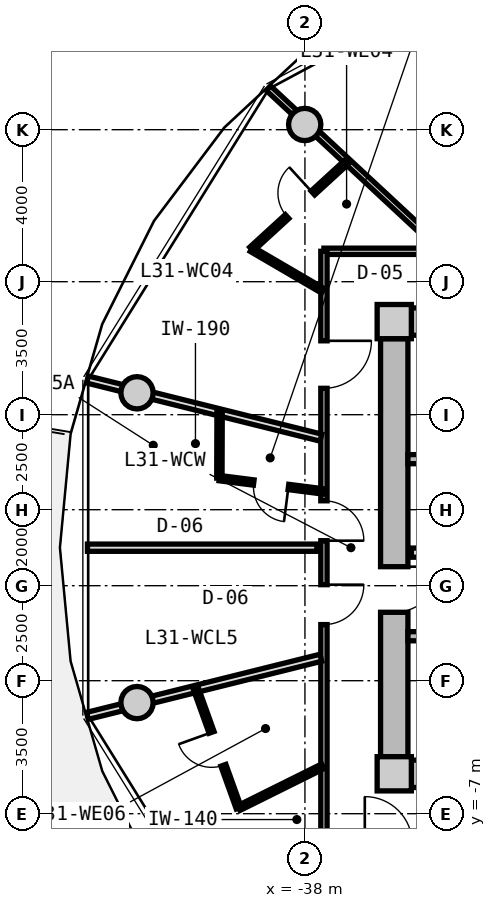
"""IFC4 building model, lengths in metres.
Left out: names, types, materials, properties, quantities, classifications, styles, units other than length and angle.
Written with IfcOpenShell. Run it as: python <this file> out.ifc"""

import sys

from ifc_helpers import new_model, si_unit, direction, frame, frame_2d, origin, origin_2d, place, context, subcontext, project, spatial, rectangle, circle, extrude, source, transform, mapped, element, fill, save


model = new_model("IFC4")
c1 = context("Model", 3, precision=1e-05, world=origin(), true_north=direction((0.0, 1.0)))
c2 = subcontext(c1, "Body", "Model", "MODEL_VIEW")
j1 = project(units=[si_unit("LENGTHUNIT", "METRE"), si_unit("PLANEANGLEUNIT", "RADIAN")], contexts=[c1])
p1 = place(None, origin())
s1 = spatial("IfcSite", under=j1, at=p1, CompositionType="ELEMENT")
p2 = place(p1, origin())
s2 = spatial("IfcBuilding", under=s1, at=p2, CompositionType="ELEMENT")
p3 = place(p2, frame((0.0, 0.0, 102.35)))
s3 = spatial("IfcBuildingStorey", under=s2, at=p3, CompositionType="ELEMENT", Elevation=102.35)
m1 = source(origin(), c2, "Body", "SweptSolid", [
    extrude(rectangle(XDim=0.9, YDim=0.9, at=origin_2d()), origin(), (0.0, 0.0, 1.0), 3.05),
])
for number, where, z_axis, x_axis in (
    (1, (-35.65, -5.95, 0.0), (0.0, 0.0, 1.0), (1.0, 0.0, 0.0)),
    (2, (-35.65, 5.95, 0.0), (0.0, 0.0, 1.0), (1.0, 0.0, 0.0)),
):
    element("IfcColumn", number, at=place(p3, frame(where, z_axis=z_axis, x_axis=x_axis)), inside=s3, PredefinedType="COLUMN", context=c2, shape_type="MappedRepresentation", body=[
        mapped(m1, transform((0.0, 0.0, 0.0), x_axis=(1.0, 0.0, 0.0), y_axis=(0.0, 1.0, 0.0), z_axis=(0.0, 0.0, 1.0), scale=1.0)),
    ])
m2 = source(origin(), c2, "Body", "SweptSolid", [
    extrude(rectangle(XDim=14.4, YDim=0.72, at=frame_2d((7.2, 0.0))), origin(), (0.0, 0.0, 1.0), 2.79),
])
for number, where, z_axis, x_axis in (
    (3, (-35.2, 5.95, 0.0), (0.0, 0.0, 1.0), (1.0, 0.0, 0.0)),
    (4, (-20.8, -5.95, 0.0), (0.0, 0.0, 1.0), (-1.0, 0.0, 0.0)),
):
    element("IfcWall", number, at=place(p3, frame(where, z_axis=z_axis, x_axis=x_axis)), inside=s3, PredefinedType="SHEAR", context=c2, shape_type="MappedRepresentation", body=[
        mapped(m2, transform((0.0, 0.0, 0.0), x_axis=(1.0, 0.0, 0.0), y_axis=(0.0, 1.0, 0.0), z_axis=(0.0, 0.0, 1.0), scale=1.0)),
    ])
m3 = source(origin(), c2, "Body", "SweptSolid", [
    extrude(rectangle(XDim=11.0, YDim=0.72, at=frame_2d((5.5, 0.0))), origin(), (0.0, 0.0, 1.0), 2.79),
])
p4 = place(p3, frame((-35.65, -5.5, 0.0), z_axis=(0.0, 0.0, 1.0), x_axis=(0.0, 1.0, 0.0)))
e5 = element("IfcWall", 5, at=p4, inside=s3, PredefinedType="SHEAR", context=c2, shape_type="MappedRepresentation", body=[
    mapped(m3, transform((0.0, 0.0, 0.0), x_axis=(1.0, 0.0, 0.0), y_axis=(0.0, 1.0, 0.0), z_axis=(0.0, 0.0, 1.0), scale=1.0)),
])
p5 = place(p4, frame((3.8, 0.0, 0.0)))
e6 = element("IfcOpeningElement", 6, at=p5, cuts=e5, PredefinedType="OPENING", context=c2, shape_type="SweptSolid", body=[
    extrude(rectangle(XDim=1.2, YDim=2.15, at=frame_2d((0.6, 1.075))), frame((0.0, 0.37, 0.0), z_axis=(0.0, -1.0, 0.0), x_axis=(1.0, 0.0, 0.0)), (0.0, 0.0, 1.0), 0.74),
])
m4 = source(origin(), c2, "Body", "SweptSolid", [
    extrude(circle(Radius=0.425, at=origin_2d()), origin(), (0.0, 0.0, 1.0), 3.05),
])
for number, where, z_axis, x_axis in (
    (7, (-38.006, 11.137, 0.0), (0.0, 0.0, 1.0), (1.0, 0.0, 0.0)),
    (8, (-42.419, 4.076, 0.0), (0.0, 0.0, 1.0), (1.0, 0.0, 0.0)),
    (9, (-42.419, -4.076, 0.0), (0.0, 0.0, 1.0), (1.0, 0.0, 0.0)),
):
    element("IfcColumn", number, at=place(p3, frame(where, z_axis=z_axis, x_axis=x_axis)), inside=s3, PredefinedType="COLUMN", context=c2, shape_type="MappedRepresentation", body=[
        mapped(m4, transform((0.0, 0.0, 0.0), x_axis=(1.0, 0.0, 0.0), y_axis=(0.0, 1.0, 0.0), z_axis=(0.0, 0.0, 1.0), scale=1.0)),
    ])
m5 = source(origin(), c2, "Body", "SweptSolid", [
    extrude(rectangle(XDim=7.83, YDim=0.24, at=frame_2d((3.915, 0.0))), origin(), (0.0, 0.0, 1.0), 2.79),
])
p6 = place(p3, frame((-35.29, 2.33, 0.0), z_axis=(0.0, 0.0, 1.0), x_axis=(1.0, 0.0, 0.0)))
e10 = element("IfcWall", 10, at=p6, inside=s3, PredefinedType="PARTITIONING", context=c2, shape_type="MappedRepresentation", body=[
    mapped(m5, transform((0.0, 0.0, 0.0), x_axis=(1.0, 0.0, 0.0), y_axis=(0.0, 1.0, 0.0), z_axis=(0.0, 0.0, 1.0), scale=1.0)),
])
p7 = place(p3, frame((-35.29, -2.33, 0.0), z_axis=(0.0, 0.0, 1.0), x_axis=(1.0, 0.0, 0.0)))
e11 = element("IfcWall", 11, at=p7, inside=s3, PredefinedType="PARTITIONING", context=c2, shape_type="MappedRepresentation", body=[
    mapped(m5, transform((0.0, 0.0, 0.0), x_axis=(1.0, 0.0, 0.0), y_axis=(0.0, 1.0, 0.0), z_axis=(0.0, 0.0, 1.0), scale=1.0)),
])
p8 = place(p7, frame((0.95, 0.0, 0.0)))
e12 = element("IfcOpeningElement", 12, at=p8, cuts=e11, PredefinedType="OPENING", context=c2, shape_type="SweptSolid", body=[
    extrude(rectangle(XDim=1.1, YDim=2.15, at=frame_2d((0.55, 1.075))), frame((0.0, 0.13, 0.0), z_axis=(0.0, -1.0, 0.0), x_axis=(1.0, 0.0, 0.0)), (0.0, 0.0, 1.0), 0.26),
])
m6 = source(origin(), c2, "Body", "SweptSolid", [
    extrude(rectangle(XDim=7.62, YDim=0.24, at=frame_2d((3.81, 0.0))), origin(), (0.0, 0.0, 1.0), 2.775),
])
p9 = place(p3, frame((-35.2, -0.13, 0.0), z_axis=(0.0, 0.0, 1.0), x_axis=(1.0, 0.0, 0.0)))
e13 = element("IfcWall", 13, at=p9, inside=s3, PredefinedType="PARTITIONING", context=c2, shape_type="MappedRepresentation", body=[
    mapped(m6, transform((0.0, 0.0, 0.0), x_axis=(1.0, 0.0, 0.0), y_axis=(0.0, 1.0, 0.0), z_axis=(0.0, 0.0, 1.0), scale=1.0)),
])
p10 = place(p9, frame((6.22, 0.0, 0.0)))
e14 = element("IfcOpeningElement", 14, at=p10, cuts=e13, PredefinedType="OPENING", context=c2, shape_type="SweptSolid", body=[
    extrude(rectangle(XDim=1.0, YDim=2.1, at=frame_2d((0.5, 1.05))), frame((0.0, 0.13, 0.0), z_axis=(0.0, -1.0, 0.0), x_axis=(1.0, 0.0, 0.0)), (0.0, 0.0, 1.0), 0.26),
])
p11 = place(p9, frame((2.4, 0.0, 0.0)))
e15 = element("IfcOpeningElement", 15, at=p11, cuts=e13, PredefinedType="OPENING", context=c2, shape_type="SweptSolid", body=[
    extrude(rectangle(XDim=1.0, YDim=2.1, at=frame_2d((0.5, 1.05))), frame((0.0, 0.13, 0.0), z_axis=(0.0, -1.0, 0.0), x_axis=(1.0, 0.0, 0.0)), (0.0, 0.0, 1.0), 0.26),
])
m7 = source(origin(), c2, "Body", "SweptSolid", [
    extrude(rectangle(XDim=8.6, YDim=0.165, at=frame_2d((4.3, 0.0))), origin(), (0.0, 0.0, 1.0), 2.775),
])
p12 = place(p3, frame((-37.5, 7.8, 0.0), z_axis=(0.0, 0.0, 1.0), x_axis=(1.0, 0.0, 0.0)))
e16 = element("IfcWall", 16, at=p12, inside=s3, PredefinedType="PARTITIONING", context=c2, shape_type="MappedRepresentation", body=[
    mapped(m7, transform((0.0, 0.0, 0.0), x_axis=(1.0, 0.0, 0.0), y_axis=(0.0, 1.0, 0.0), z_axis=(0.0, 0.0, 1.0), scale=1.0)),
])
m8 = source(origin(), c2, "Body", "SweptSolid", [
    extrude(rectangle(XDim=15.6, YDim=0.165, at=frame_2d((7.8, 0.0))), origin(), (0.0, 0.0, 1.0), 2.775),
])
p13 = place(p3, frame((-37.5, -7.8, 0.0), z_axis=(0.0, 0.0, 1.0), x_axis=(0.0, 1.0, 0.0)))
e17 = element("IfcWall", 17, at=p13, inside=s3, PredefinedType="PARTITIONING", context=c2, shape_type="MappedRepresentation", body=[
    mapped(m8, transform((0.0, 0.0, 0.0), x_axis=(1.0, 0.0, 0.0), y_axis=(0.0, 1.0, 0.0), z_axis=(0.0, 0.0, 1.0), scale=1.0)),
])
p14 = place(p13, frame((11.994, 0.0, 0.0)))
e18 = element("IfcOpeningElement", 18, at=p14, cuts=e17, PredefinedType="OPENING", context=c2, shape_type="SweptSolid", body=[
    extrude(rectangle(XDim=1.25, YDim=2.2, at=frame_2d((0.625, 1.1))), frame((0.0, 0.093, 0.0), z_axis=(0.0, -1.0, 0.0), x_axis=(1.0, 0.0, 0.0)), (0.0, 0.0, 1.0), 0.185),
])
p15 = place(p13, frame((7.984, 0.0, 0.0)))
e19 = element("IfcOpeningElement", 19, at=p15, cuts=e17, PredefinedType="OPENING", context=c2, shape_type="SweptSolid", body=[
    extrude(rectangle(XDim=1.05, YDim=2.15, at=frame_2d((0.525, 1.075))), frame((0.0, 0.093, 0.0), z_axis=(0.0, -1.0, 0.0), x_axis=(1.0, 0.0, 0.0)), (0.0, 0.0, 1.0), 0.185),
])
p16 = place(p13, frame((5.777, 0.0, 0.0)))
e20 = element("IfcOpeningElement", 20, at=p16, cuts=e17, PredefinedType="OPENING", context=c2, shape_type="SweptSolid", body=[
    extrude(rectangle(XDim=1.05, YDim=2.15, at=frame_2d((0.525, 1.075))), frame((0.0, 0.093, 0.0), z_axis=(0.0, -1.0, 0.0), x_axis=(1.0, 0.0, 0.0)), (0.0, 0.0, 1.0), 0.185),
])
m9 = source(origin(), c2, "Body", "SweptSolid", [
    extrude(rectangle(XDim=6.187, YDim=0.165, at=frame_2d((3.093, 0.0))), origin(), (0.0, 0.0, 1.0), 2.275),
])
p17 = place(p3, frame((-34.429, 7.88, 0.0), z_axis=(0.0, 0.0, 1.0), x_axis=(-0.732501077882, 0.680765870841, 0.0)))
e21 = element("IfcWall", 21, at=p17, inside=s3, PredefinedType="PARTITIONING", context=c2, shape_type="MappedRepresentation", body=[
    mapped(m9, transform((0.0, 0.0, 0.0), x_axis=(1.0, 0.0, 0.0), y_axis=(0.0, 1.0, 0.0), z_axis=(0.0, 0.0, 1.0), scale=1.0)),
])
m10 = source(origin(), c2, "Body", "SweptSolid", [
    extrude(rectangle(XDim=6.331, YDim=0.19, at=frame_2d((3.165, 0.0))), origin(), (0.0, 0.0, 1.0), 2.275),
])
p18 = place(p3, frame((-37.58, 2.896, 0.0), z_axis=(0.0, 0.0, 1.0), x_axis=(-0.97036440661, 0.241646267062, 0.0)))
e22 = element("IfcWall", 22, at=p18, inside=s3, PredefinedType="PARTITIONING", context=c2, shape_type="MappedRepresentation", body=[
    mapped(m10, transform((0.0, 0.0, 0.0), x_axis=(1.0, 0.0, 0.0), y_axis=(0.0, 1.0, 0.0), z_axis=(0.0, 0.0, 1.0), scale=1.0)),
])
m11 = source(origin(), c2, "Body", "SweptSolid", [
    extrude(rectangle(XDim=2.172, YDim=0.14, at=frame_2d((1.086, 0.0))), origin(), (0.0, 0.0, 1.0), 2.775),
])
p19 = place(p3, frame((-37.53, 6.762, 0.0), z_axis=(0.0, 0.0, 1.0), x_axis=(-0.863562702562, 0.504241468688, 0.0)))
e23 = element("IfcWall", 23, at=p19, inside=s3, PredefinedType="PARTITIONING", context=c2, shape_type="MappedRepresentation", body=[
    mapped(m11, transform((0.0, 0.0, 0.0), x_axis=(1.0, 0.0, 0.0), y_axis=(0.0, 1.0, 0.0), z_axis=(0.0, 0.0, 1.0), scale=1.0)),
])
m12 = source(origin(), c2, "Body", "SweptSolid", [
    extrude(rectangle(XDim=3.457, YDim=0.14, at=frame_2d((1.729, 0.0))), origin(), (0.0, 0.0, 1.0), 2.775),
])
p20 = place(p3, frame((-39.405, 7.857, 0.0), z_axis=(0.0, 0.0, 1.0), x_axis=(0.737567375492, 0.675273549467, 0.0)))
e24 = element("IfcWall", 24, at=p20, inside=s3, PredefinedType="PARTITIONING", context=c2, shape_type="MappedRepresentation", body=[
    mapped(m12, transform((0.0, 0.0, 0.0), x_axis=(1.0, 0.0, 0.0), y_axis=(0.0, 1.0, 0.0), z_axis=(0.0, 0.0, 1.0), scale=1.0)),
])
p21 = place(p20, frame((1.268, 0.0, 0.0)))
e25 = element("IfcOpeningElement", 25, at=p21, cuts=e24, PredefinedType="OPENING", context=c2, shape_type="SweptSolid", body=[
    extrude(rectangle(XDim=0.92, YDim=2.1, at=frame_2d((0.46, 1.05))), frame((0.0, 0.08, 0.0), z_axis=(0.0, -1.0, 0.0), x_axis=(1.0, 0.0, 0.0)), (0.0, 0.0, 1.0), 0.16),
])
p22 = place(p3, frame((-37.58, -2.896, 0.0), z_axis=(0.0, 0.0, 1.0), x_axis=(-0.97036440661, -0.241646267062, 0.0)))
e26 = element("IfcWall", 26, at=p22, inside=s3, PredefinedType="PARTITIONING", context=c2, shape_type="MappedRepresentation", body=[
    mapped(m10, transform((0.0, 0.0, 0.0), x_axis=(1.0, 0.0, 0.0), y_axis=(0.0, 1.0, 0.0), z_axis=(0.0, 0.0, 1.0), scale=1.0)),
])
m13 = source(origin(), c2, "Body", "SweptSolid", [
    extrude(rectangle(XDim=6.039, YDim=0.19, at=frame_2d((3.019, 0.0))), origin(), (0.0, 0.0, 1.0), 2.775),
])
p23 = place(p3, frame((-37.685, 0.0, 0.0), z_axis=(0.0, 0.0, 1.0), x_axis=(-1.0, 0.0, 0.0)))
e27 = element("IfcWall", 27, at=p23, inside=s3, PredefinedType="PARTITIONING", context=c2, shape_type="MappedRepresentation", body=[
    mapped(m13, transform((0.0, 0.0, 0.0), x_axis=(1.0, 0.0, 0.0), y_axis=(0.0, 1.0, 0.0), z_axis=(0.0, 0.0, 1.0), scale=1.0)),
])
m14 = source(origin(), c2, "Body", "SweptSolid", [
    extrude(rectangle(XDim=2.744, YDim=0.14, at=frame_2d((1.372, 0.0))), origin(), (0.0, 0.0, 1.0), 2.775),
])
p24 = place(p3, frame((-37.53, 1.482, 0.0), z_axis=(0.0, 0.0, 1.0), x_axis=(-0.991916450239, 0.126892693823, 0.0)))
e28 = element("IfcWall", 28, at=p24, inside=s3, PredefinedType="PARTITIONING", context=c2, shape_type="MappedRepresentation", body=[
    mapped(m14, transform((0.0, 0.0, 0.0), x_axis=(1.0, 0.0, 0.0), y_axis=(0.0, 1.0, 0.0), z_axis=(0.0, 0.0, 1.0), scale=1.0)),
])
p25 = place(p24, frame((0.912, 0.0, 0.0)))
e29 = element("IfcOpeningElement", 29, at=p25, cuts=e28, PredefinedType="OPENING", context=c2, shape_type="SweptSolid", body=[
    extrude(rectangle(XDim=0.92, YDim=2.1, at=frame_2d((0.46, 1.05))), frame((0.0, 0.08, 0.0), z_axis=(0.0, -1.0, 0.0), x_axis=(1.0, 0.0, 0.0)), (0.0, 0.0, 1.0), 0.16),
])
m15 = source(origin(), c2, "Body", "SweptSolid", [
    extrude(rectangle(XDim=1.749, YDim=0.14, at=frame_2d((0.875, 0.0))), origin(), (0.0, 0.0, 1.0), 2.775),
])
p26 = place(p3, frame((-40.251, 1.831, 0.0), z_axis=(0.0, 0.0, 1.0), x_axis=(0.003350064953, 0.999994388517, 0.0)))
e30 = element("IfcWall", 30, at=p26, inside=s3, PredefinedType="PARTITIONING", context=c2, shape_type="MappedRepresentation", body=[
    mapped(m15, transform((0.0, 0.0, 0.0), x_axis=(1.0, 0.0, 0.0), y_axis=(0.0, 1.0, 0.0), z_axis=(0.0, 0.0, 1.0), scale=1.0)),
])
m16 = source(origin(), c2, "Body", "SweptSolid", [
    extrude(rectangle(XDim=2.469, YDim=0.14, at=frame_2d((1.235, 0.0))), origin(), (0.0, 0.0, 1.0), 2.775),
])
p27 = place(p3, frame((-37.53, -5.754, 0.0), z_axis=(0.0, 0.0, 1.0), x_axis=(-0.895512172456, -0.445037019789, 0.0)))
e31 = element("IfcWall", 31, at=p27, inside=s3, PredefinedType="PARTITIONING", context=c2, shape_type="MappedRepresentation", body=[
    mapped(m16, transform((0.0, 0.0, 0.0), x_axis=(1.0, 0.0, 0.0), y_axis=(0.0, 1.0, 0.0), z_axis=(0.0, 0.0, 1.0), scale=1.0)),
])
m17 = source(origin(), c2, "Body", "SweptSolid", [
    extrude(rectangle(XDim=3.314, YDim=0.14, at=frame_2d((1.657, 0.0))), origin(), (0.0, 0.0, 1.0), 2.775),
])
p28 = place(p3, frame((-39.741, -6.853, 0.0), z_axis=(0.0, 0.0, 1.0), x_axis=(-0.338067217654, 0.941121966776, 0.0)))
e32 = element("IfcWall", 32, at=p28, inside=s3, PredefinedType="PARTITIONING", context=c2, shape_type="MappedRepresentation", body=[
    mapped(m17, transform((0.0, 0.0, 0.0), x_axis=(1.0, 0.0, 0.0), y_axis=(0.0, 1.0, 0.0), z_axis=(0.0, 0.0, 1.0), scale=1.0)),
])
p29 = place(p28, frame((1.197, 0.0, 0.0)))
e33 = element("IfcOpeningElement", 33, at=p29, cuts=e32, PredefinedType="OPENING", context=c2, shape_type="SweptSolid", body=[
    extrude(rectangle(XDim=0.92, YDim=2.1, at=frame_2d((0.46, 1.05))), frame((0.0, 0.08, 0.0), z_axis=(0.0, -1.0, 0.0), x_axis=(1.0, 0.0, 0.0)), (0.0, 0.0, 1.0), 0.16),
])
m18 = source(origin(), c2, "Body", "SweptSolid", [
    extrude(rectangle(XDim=1.2, YDim=2.15, at=frame_2d((0.6, 1.075))), frame((0.0, 0.025, 0.0), z_axis=(0.0, -1.0, 0.0), x_axis=(1.0, 0.0, 0.0)), (0.0, 0.0, 1.0), 0.05),
])
p30 = place(p5, frame((1.2, 0.0, 0.0), z_axis=(0.0, 0.0, 1.0), x_axis=(-1.0, 0.0, 0.0)))
e34 = element("IfcDoor", 34, at=p30, inside=s3, OperationType="SINGLE_SWING_LEFT", PredefinedType="DOOR", context=c2, shape_type="MappedRepresentation", body=[
    mapped(m18, transform((0.0, 0.0, 0.0), x_axis=(1.0, 0.0, 0.0), y_axis=(0.0, 1.0, 0.0), z_axis=(0.0, 0.0, 1.0), scale=1.0)),
])
fill(e6, e34)
m19 = source(origin(), c2, "Body", "SweptSolid", [
    extrude(rectangle(XDim=1.25, YDim=2.2, at=frame_2d((0.625, 1.1))), frame((0.0, 0.025, 0.0), z_axis=(0.0, -1.0, 0.0), x_axis=(1.0, 0.0, 0.0)), (0.0, 0.0, 1.0), 0.05),
])
p31 = place(p14, frame((1.25, 0.0, 0.0), z_axis=(0.0, 0.0, 1.0), x_axis=(-1.0, 0.0, 0.0)))
e35 = element("IfcDoor", 35, at=p31, inside=s3, OperationType="SINGLE_SWING_LEFT", PredefinedType="DOOR", context=c2, shape_type="MappedRepresentation", body=[
    mapped(m19, transform((0.0, 0.0, 0.0), x_axis=(1.0, 0.0, 0.0), y_axis=(0.0, 1.0, 0.0), z_axis=(0.0, 0.0, 1.0), scale=1.0)),
])
fill(e18, e35)
m20 = source(origin(), c2, "Body", "SweptSolid", [
    extrude(rectangle(XDim=0.92, YDim=2.1, at=frame_2d((0.46, 1.05))), frame((0.0, 0.025, 0.0), z_axis=(0.0, -1.0, 0.0), x_axis=(1.0, 0.0, 0.0)), (0.0, 0.0, 1.0), 0.05),
])
p32 = place(p21, origin())
e36 = element("IfcDoor", 36, at=p32, inside=s3, OperationType="SINGLE_SWING_RIGHT", PredefinedType="DOOR", context=c2, shape_type="MappedRepresentation", body=[
    mapped(m20, transform((0.0, 0.0, 0.0), x_axis=(1.0, 0.0, 0.0), y_axis=(0.0, 1.0, 0.0), z_axis=(0.0, 0.0, 1.0), scale=1.0)),
])
fill(e25, e36)
m21 = source(origin(), c2, "Body", "SweptSolid", [
    extrude(rectangle(XDim=1.05, YDim=2.15, at=frame_2d((0.525, 1.075))), frame((0.0, 0.025, 0.0), z_axis=(0.0, -1.0, 0.0), x_axis=(1.0, 0.0, 0.0)), (0.0, 0.0, 1.0), 0.05),
])
p33 = place(p15, frame((1.05, 0.0, 0.0), z_axis=(0.0, 0.0, 1.0), x_axis=(-1.0, 0.0, 0.0)))
e37 = element("IfcDoor", 37, at=p33, inside=s3, OperationType="SINGLE_SWING_RIGHT", PredefinedType="DOOR", context=c2, shape_type="MappedRepresentation", body=[
    mapped(m21, transform((0.0, 0.0, 0.0), x_axis=(1.0, 0.0, 0.0), y_axis=(0.0, 1.0, 0.0), z_axis=(0.0, 0.0, 1.0), scale=1.0)),
])
fill(e19, e37)
p34 = place(p25, origin())
e38 = element("IfcDoor", 38, at=p34, inside=s3, OperationType="SINGLE_SWING_LEFT", PredefinedType="DOOR", context=c2, shape_type="MappedRepresentation", body=[
    mapped(m20, transform((0.0, 0.0, 0.0), x_axis=(1.0, 0.0, 0.0), y_axis=(0.0, 1.0, 0.0), z_axis=(0.0, 0.0, 1.0), scale=1.0)),
])
fill(e29, e38)
p35 = place(p16, frame((1.05, 0.0, 0.0), z_axis=(0.0, 0.0, 1.0), x_axis=(-1.0, 0.0, 0.0)))
e39 = element("IfcDoor", 39, at=p35, inside=s3, OperationType="SINGLE_SWING_LEFT", PredefinedType="DOOR", context=c2, shape_type="MappedRepresentation", body=[
    mapped(m21, transform((0.0, 0.0, 0.0), x_axis=(1.0, 0.0, 0.0), y_axis=(0.0, 1.0, 0.0), z_axis=(0.0, 0.0, 1.0), scale=1.0)),
])
fill(e20, e39)
p36 = place(p29, origin())
e40 = element("IfcDoor", 40, at=p36, inside=s3, OperationType="SINGLE_SWING_RIGHT", PredefinedType="DOOR", context=c2, shape_type="MappedRepresentation", body=[
    mapped(m20, transform((0.0, 0.0, 0.0), x_axis=(1.0, 0.0, 0.0), y_axis=(0.0, 1.0, 0.0), z_axis=(0.0, 0.0, 1.0), scale=1.0)),
])
fill(e33, e40)
save(model, sys.argv[1])
